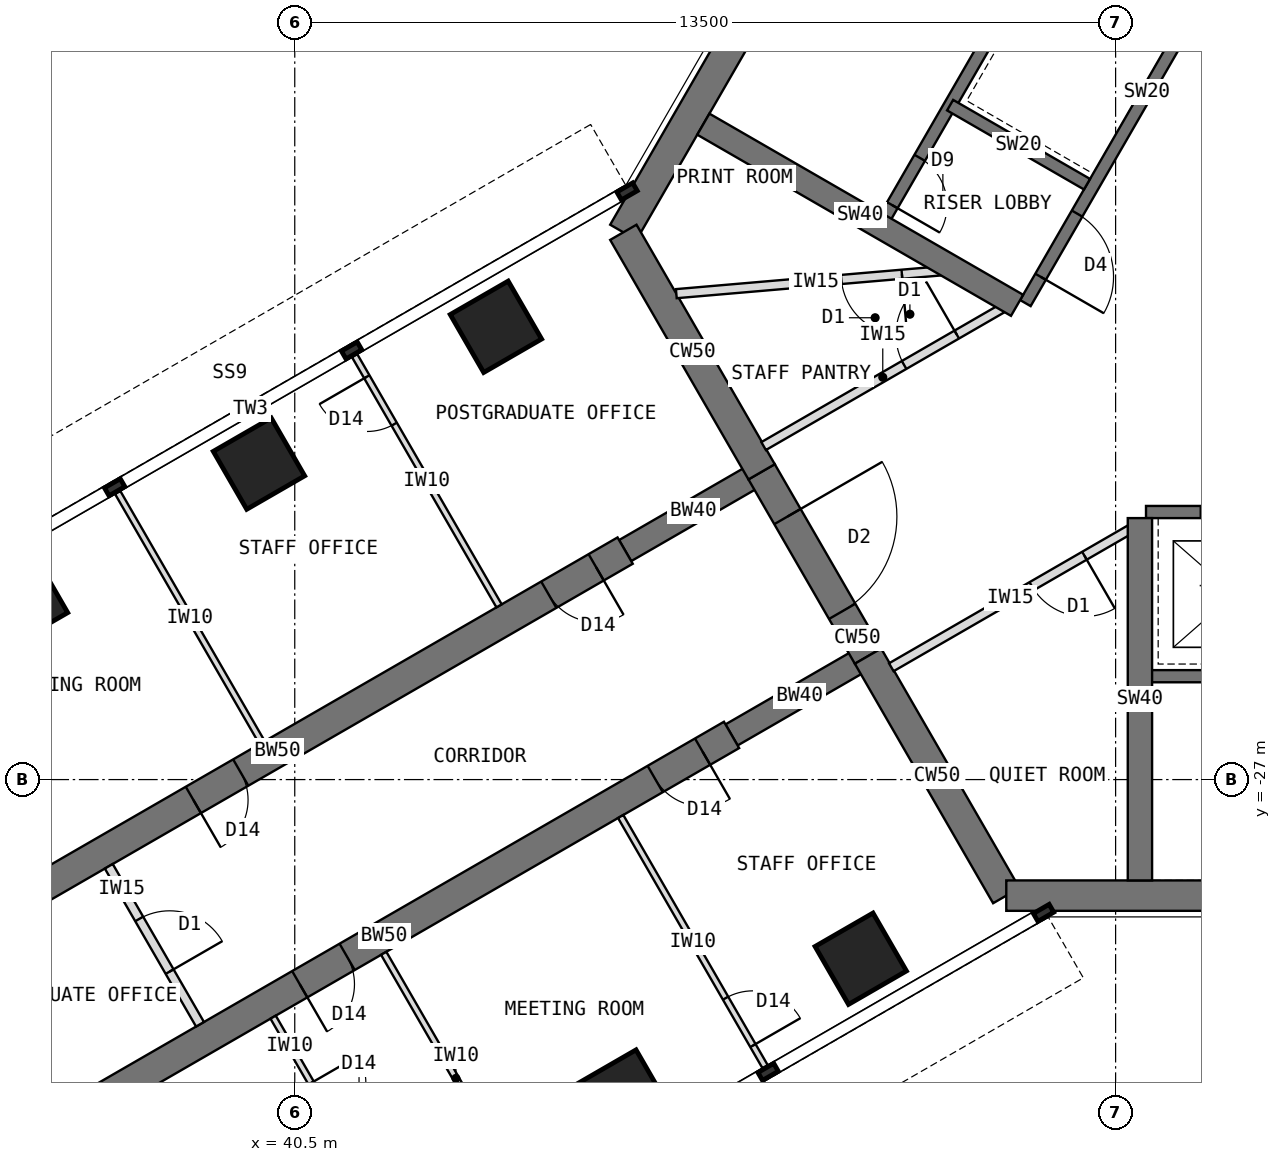
"""IFC4 building model, lengths in metres.
Left out: names, types, materials, properties, quantities, classifications, styles, units other than length and angle.
Written with IfcOpenShell. Run it as: python <this file> out.ifc"""

import sys

from ifc_helpers import new_model, si_unit, direction, frame, frame_2d, origin, origin_2d, place, context, subcontext, project, spatial, rectangle, extrude, element, fill, save


model = new_model("IFC4")
c1 = context("Model", 3, precision=1e-05, world=origin(), true_north=direction((0.0, 1.0)))
c2 = subcontext(c1, "Body", "Model", "MODEL_VIEW")
j1 = project(units=[si_unit("LENGTHUNIT", "METRE"), si_unit("PLANEANGLEUNIT", "RADIAN")], contexts=[c1])
p1 = place(None, origin())
s1 = spatial("IfcSite", under=j1, at=p1, CompositionType="ELEMENT")
p2 = place(p1, origin())
s2 = spatial("IfcBuilding", under=s1, at=p2, CompositionType="ELEMENT")
p3 = place(p2, frame((0.0, 0.0, 230.5)))
s3 = spatial("IfcBuildingStorey", under=s2, at=p3, CompositionType="ELEMENT", Elevation=230.5)
p4 = place(p3, frame((52.202, -7.092, 0.0), z_axis=(0.0, 0.0, 1.0), x_axis=(-0.500005998175, -0.866021940709, 0.0)))
e1 = element("IfcWall", 1, at=p4, inside=s3, PredefinedType="SHEAR", context=c2, shape_type="SweptSolid", body=[
    extrude(rectangle(XDim=12.596, YDim=0.5, at=frame_2d((6.298, 0.0))), origin(), (0.0, 0.0, 1.0), 4.0),
])
p5 = place(p3, frame((45.904, -18.0, 0.0), z_axis=(0.0, 0.0, 1.0), x_axis=(0.500024481964, -0.866011268655, 0.0)))
e2 = element("IfcWall", 2, at=p5, inside=s3, PredefinedType="SHEAR", context=c2, shape_type="SweptSolid", body=[
    extrude(rectangle(XDim=4.548, YDim=0.5, at=frame_2d((2.274, 0.0))), origin(), (0.0, 0.0, 1.0), 4.0),
])
p6 = place(p3, frame((48.178, -21.939, 0.0), z_axis=(0.0, 0.0, 1.0), x_axis=(0.500010275428, -0.866019471182, 0.0)))
e3 = element("IfcWall", 3, at=p6, inside=s3, PredefinedType="SHEAR", context=c2, shape_type="SweptSolid", body=[
    extrude(rectangle(XDim=3.5, YDim=0.5, at=frame_2d((1.75, 0.0))), origin(), (0.0, 0.0, 1.0), 4.0),
])
p7 = place(p6, frame((0.85, 0.0, 0.0)))
e4 = element("IfcOpeningElement", 4, at=p7, cuts=e3, PredefinedType="OPENING", context=c2, shape_type="SweptSolid", body=[
    extrude(rectangle(XDim=1.8, YDim=2.1, at=frame_2d((0.9, 1.05))), frame((0.0, 0.26, 0.0), z_axis=(0.0, -1.0, 0.0), x_axis=(1.0, 0.0, 0.0)), (0.0, 0.0, 1.0), 0.52),
])
p8 = place(p3, frame((49.928, -24.97, 0.0), z_axis=(0.0, 0.0, 1.0), x_axis=(0.499984222037, -0.866034513004, 0.0)))
e5 = element("IfcWall", 5, at=p8, inside=s3, PredefinedType="SHEAR", context=c2, shape_type="SweptSolid", body=[
    extrude(rectangle(XDim=4.548, YDim=0.5, at=frame_2d((2.274, 0.0))), origin(), (0.0, 0.0, 1.0), 4.0),
])
p9 = place(p3, frame((52.202, -28.908, 0.0), z_axis=(0.0, 0.0, 1.0), x_axis=(1.0, 0.0, 0.0)))
e6 = element("IfcWall", 6, at=p9, inside=s3, PredefinedType="SHEAR", context=c2, shape_type="SweptSolid", body=[
    extrude(rectangle(XDim=12.596, YDim=0.5, at=frame_2d((6.298, 0.0))), origin(), (0.0, 0.0, 1.0), 4.0),
])
p10 = place(p3, frame((49.928, -24.97, 0.0), z_axis=(0.0, 0.0, 1.0), x_axis=(-0.866031863473, -0.499988811324, 0.0)))
e7 = element("IfcWall", 7, at=p10, inside=s3, PredefinedType="SHEAR", context=c2, shape_type="SweptSolid", body=[
    extrude(rectangle(XDim=2.592, YDim=0.4, at=frame_2d((1.296, 0.0))), origin(), (0.0, 0.0, 1.0), 4.0),
])
p11 = place(p3, frame((47.684, -26.266, 0.0), z_axis=(0.0, 0.0, 1.0), x_axis=(-0.866027579429, -0.499996231654, 0.0)))
e8 = element("IfcWall", 8, at=p11, inside=s3, PredefinedType="SHEAR", context=c2, shape_type="SweptSolid", body=[
    extrude(rectangle(XDim=13.2, YDim=0.5, at=frame_2d((6.6, 0.0))), origin(), (0.0, 0.0, 1.0), 4.0),
])
p12 = place(p11, frame((0.55, 0.0, 0.0)))
e9 = element("IfcOpeningElement", 9, at=p12, cuts=e8, PredefinedType="OPENING", context=c2, shape_type="SweptSolid", body=[
    extrude(rectangle(XDim=0.9, YDim=2.1, at=frame_2d((0.45, 1.05))), frame((0.0, 0.26, 0.0), z_axis=(0.0, -1.0, 0.0), x_axis=(1.0, 0.0, 0.0)), (0.0, 0.0, 1.0), 0.52),
])
p13 = place(p11, frame((7.3, 0.0, 0.0)))
e10 = element("IfcOpeningElement", 10, at=p13, cuts=e8, PredefinedType="OPENING", context=c2, shape_type="SweptSolid", body=[
    extrude(rectangle(XDim=0.9, YDim=2.1, at=frame_2d((0.45, 1.05))), frame((0.0, 0.26, 0.0), z_axis=(0.0, -1.0, 0.0), x_axis=(1.0, 0.0, 0.0)), (0.0, 0.0, 1.0), 0.52),
])
p14 = place(p3, frame((48.178, -21.939, 0.0), z_axis=(0.0, 0.0, 1.0), x_axis=(-0.866072649678, -0.499918158782, 0.0)))
e11 = element("IfcWall", 11, at=p14, inside=s3, PredefinedType="SHEAR", context=c2, shape_type="SweptSolid", body=[
    extrude(rectangle(XDim=2.592, YDim=0.4, at=frame_2d((1.296, 0.0))), origin(), (0.0, 0.0, 1.0), 4.0),
])
p15 = place(p3, frame((45.934, -23.234, 0.0), z_axis=(0.0, 0.0, 1.0), x_axis=(-0.866019570528, -0.500010103361, 0.0)))
e12 = element("IfcWall", 12, at=p15, inside=s3, PredefinedType="SHEAR", context=c2, shape_type="SweptSolid", body=[
    extrude(rectangle(XDim=13.2, YDim=0.5, at=frame_2d((6.6, 0.0))), origin(), (0.0, 0.0, 1.0), 4.0),
])
p16 = place(p15, frame((0.55, 0.0, 0.0)))
e13 = element("IfcOpeningElement", 13, at=p16, cuts=e12, PredefinedType="OPENING", context=c2, shape_type="SweptSolid", body=[
    extrude(rectangle(XDim=0.9, YDim=2.1, at=frame_2d((0.45, 1.05))), frame((0.0, 0.26, 0.0), z_axis=(0.0, -1.0, 0.0), x_axis=(1.0, 0.0, 0.0)), (0.0, 0.0, 1.0), 0.52),
])
p17 = place(p15, frame((7.3, 0.0, 0.0)))
e14 = element("IfcOpeningElement", 14, at=p17, cuts=e12, PredefinedType="OPENING", context=c2, shape_type="SweptSolid", body=[
    extrude(rectangle(XDim=0.9, YDim=2.1, at=frame_2d((0.45, 1.05))), frame((0.0, 0.26, 0.0), z_axis=(0.0, -1.0, 0.0), x_axis=(1.0, 0.0, 0.0)), (0.0, 0.0, 1.0), 0.52),
])
for number, where, z_axis, x_axis in (
    (15, (49.809, -29.946, 0.0), (0.0, 0.0, 1.0), (0.866, 0.5, 0.0)),
    (16, (43.809, -19.554, 0.0), (0.0, 0.0, 1.0), (0.866, 0.5, 0.0)),
    (17, (45.912, -32.196, 0.0), (0.0, 0.0, 1.0), (0.866, 0.5, 0.0)),
    (18, (39.912, -21.804, 0.0), (0.0, 0.0, 1.0), (0.866, 0.5, 0.0)),
    (19, (36.014, -24.054, 0.0), (0.0, 0.0, 1.0), (0.866, 0.5, 0.0)),
):
    element("IfcColumn", number, at=place(p3, frame(where, z_axis=z_axis, x_axis=x_axis)), inside=s3, PredefinedType="COLUMN", context=c2, shape_type="SweptSolid", body=[
        extrude(rectangle(XDim=1.1, YDim=1.1, at=origin_2d()), origin(), (0.0, 0.0, 1.0), 4.0),
    ])
p18 = place(p3, frame((56.516, -12.236, 0.0), z_axis=(0.0, 0.0, 1.0), x_axis=(-0.49999894854, -0.866026010844, 0.0)))
e20 = element("IfcWall", 20, at=p18, inside=s3, PredefinedType="SHEAR", context=c2, shape_type="SweptSolid", body=[
    extrude(rectangle(XDim=8.0, YDim=0.2, at=frame_2d((4.0, 0.0))), origin(), (0.0, 0.0, 1.0), 4.0),
])
p19 = place(p18, frame((6.3, 0.0, 0.0)))
e21 = element("IfcOpeningElement", 21, at=p19, cuts=e20, PredefinedType="OPENING", context=c2, shape_type="SweptSolid", body=[
    extrude(rectangle(XDim=1.2, YDim=2.1, at=frame_2d((0.6, 1.05))), frame((0.0, 0.11, 0.0), z_axis=(0.0, -1.0, 0.0), x_axis=(1.0, 0.0, 0.0)), (0.0, 0.0, 1.0), 0.22),
])
p20 = place(p3, frame((53.53, -17.209, 0.0), z_axis=(0.0, 0.0, 1.0), x_axis=(-0.866062058628, 0.499936506574, 0.0)))
e22 = element("IfcWall", 22, at=p20, inside=s3, PredefinedType="SHEAR", context=c2, shape_type="SweptSolid", body=[
    extrude(rectangle(XDim=2.6, YDim=0.2, at=frame_2d((1.3, 0.0))), origin(), (0.0, 0.0, 1.0), 4.0),
])
p21 = place(p3, frame((54.178, -10.886, 0.0), z_axis=(0.0, 0.0, 1.0), x_axis=(-0.49999894854, -0.866026010844, 0.0)))
e23 = element("IfcWall", 23, at=p21, inside=s3, PredefinedType="SHEAR", context=c2, shape_type="SweptSolid", body=[
    extrude(rectangle(XDim=8.0, YDim=0.2, at=frame_2d((4.0, 0.0))), origin(), (0.0, 0.0, 1.0), 4.0),
])
p22 = place(p21, frame((6.8, 0.0, 0.0)))
e24 = element("IfcOpeningElement", 24, at=p22, cuts=e23, PredefinedType="OPENING", context=c2, shape_type="SweptSolid", body=[
    extrude(rectangle(XDim=0.9, YDim=2.1, at=frame_2d((0.45, 1.05))), frame((0.0, 0.11, 0.0), z_axis=(0.0, -1.0, 0.0), x_axis=(1.0, 0.0, 0.0)), (0.0, 0.0, 1.0), 0.22),
])
p23 = place(p3, frame((52.38, -19.201, 0.0), z_axis=(0.0, 0.0, 1.0), x_axis=(-0.866012946976, 0.500021575205, 0.0)))
e25 = element("IfcWall", 25, at=p23, inside=s3, PredefinedType="SHEAR", context=c2, shape_type="SweptSolid", body=[
    extrude(rectangle(XDim=5.958, YDim=0.4, at=frame_2d((2.979, 0.0))), origin(), (0.0, 0.0, 1.0), 4.0),
])
p24 = place(p3, frame((54.5, -22.6, 0.0), z_axis=(0.0, 0.0, 1.0), x_axis=(1.0, 0.0, 0.0)))
e26 = element("IfcWall", 26, at=p24, inside=s3, PredefinedType="SHEAR", context=c2, shape_type="SweptSolid", body=[
    extrude(rectangle(XDim=8.0, YDim=0.2, at=frame_2d((4.0, 0.0))), origin(), (0.0, 0.0, 1.0), 4.0),
])
p25 = place(p24, frame((6.3, 0.0, 0.0)))
e27 = element("IfcOpeningElement", 27, at=p25, cuts=e26, PredefinedType="OPENING", context=c2, shape_type="SweptSolid", body=[
    extrude(rectangle(XDim=1.2, YDim=2.1, at=frame_2d((0.6, 1.05))), frame((0.0, 0.11, 0.0), z_axis=(0.0, -1.0, 0.0), x_axis=(1.0, 0.0, 0.0)), (0.0, 0.0, 1.0), 0.22),
])
p26 = place(p24, frame((0.9, 0.0, 0.0)))
e28 = element("IfcOpeningElement", 28, at=p26, cuts=e26, PredefinedType="OPENING", context=c2, shape_type="SweptSolid", body=[
    extrude(rectangle(XDim=1.1, YDim=2.2, at=frame_2d((0.55, 1.1))), frame((0.0, 0.11, 0.0), z_axis=(0.0, -1.0, 0.0), x_axis=(1.0, 0.0, 0.0)), (0.0, 0.0, 1.0), 0.22),
])
p27 = place(p3, frame((54.5, -25.3, 0.0), z_axis=(0.0, 0.0, 1.0), x_axis=(1.0, 0.0, 0.0)))
e29 = element("IfcWall", 29, at=p27, inside=s3, PredefinedType="SHEAR", context=c2, shape_type="SweptSolid", body=[
    extrude(rectangle(XDim=8.0, YDim=0.2, at=frame_2d((4.0, 0.0))), origin(), (0.0, 0.0, 1.0), 4.0),
])
p28 = place(p27, frame((6.7, 0.0, 0.0)))
e30 = element("IfcOpeningElement", 30, at=p28, cuts=e29, PredefinedType="OPENING", context=c2, shape_type="SweptSolid", body=[
    extrude(rectangle(XDim=1.1, YDim=2.1, at=frame_2d((0.55, 1.05))), frame((0.0, 0.11, 0.0), z_axis=(0.0, -1.0, 0.0), x_axis=(1.0, 0.0, 0.0)), (0.0, 0.0, 1.0), 0.22),
])
p29 = place(p3, frame((54.4, -22.7, 0.0), z_axis=(0.0, 0.0, 1.0), x_axis=(0.0, -1.0, 0.0)))
e31 = element("IfcWall", 31, at=p29, inside=s3, PredefinedType="SHEAR", context=c2, shape_type="SweptSolid", body=[
    extrude(rectangle(XDim=5.958, YDim=0.4, at=frame_2d((2.979, 0.0))), origin(), (0.0, 0.0, 1.0), 4.0),
])
p30 = place(p3, frame((45.86, -27.607, 0.0), z_axis=(0.0, 0.0, 1.0), x_axis=(0.499986429846, -0.866033238375, 0.0)))
e32 = element("IfcWall", 32, at=p30, inside=s3, PredefinedType="PARTITIONING", context=c2, shape_type="SweptSolid", body=[
    extrude(rectangle(XDim=4.75, YDim=0.1, at=frame_2d((2.375, 0.0))), origin(), (0.0, 0.0, 1.0), 3.8),
])
p31 = place(p30, frame((3.45, 0.0, 0.0)))
e33 = element("IfcOpeningElement", 33, at=p31, cuts=e32, PredefinedType="OPENING", context=c2, shape_type="SweptSolid", body=[
    extrude(rectangle(XDim=0.9, YDim=2.1, at=frame_2d((0.45, 1.05))), frame((0.0, 0.06, 0.0), z_axis=(0.0, -1.0, 0.0), x_axis=(1.0, 0.0, 0.0)), (0.0, 0.0, 1.0), 0.12),
])
p32 = place(p3, frame((41.963, -29.857, 0.0), z_axis=(0.0, 0.0, 1.0), x_axis=(0.499986429846, -0.866033238375, 0.0)))
e34 = element("IfcWall", 34, at=p32, inside=s3, PredefinedType="PARTITIONING", context=c2, shape_type="SweptSolid", body=[
    extrude(rectangle(XDim=4.75, YDim=0.1, at=frame_2d((2.375, 0.0))), origin(), (0.0, 0.0, 1.0), 3.8),
])
p33 = place(p3, frame((40.144, -30.907, 0.0), z_axis=(0.0, 0.0, 1.0), x_axis=(0.499977295307, -0.866038511948, 0.0)))
e35 = element("IfcWall", 35, at=p33, inside=s3, PredefinedType="PARTITIONING", context=c2, shape_type="SweptSolid", body=[
    extrude(rectangle(XDim=3.4, YDim=0.1, at=frame_2d((1.7, 0.0))), origin(), (0.0, 0.0, 1.0), 3.8),
])
p34 = place(p33, frame((1.25, 0.0, 0.0)))
e36 = element("IfcOpeningElement", 36, at=p34, cuts=e35, PredefinedType="OPENING", context=c2, shape_type="SweptSolid", body=[
    extrude(rectangle(XDim=0.9, YDim=2.1, at=frame_2d((0.45, 1.05))), frame((0.0, 0.06, 0.0), z_axis=(0.0, -1.0, 0.0), x_axis=(1.0, 0.0, 0.0)), (0.0, 0.0, 1.0), 0.12),
])
p35 = place(p3, frame((43.86, -24.143, 0.0), z_axis=(0.0, 0.0, 1.0), x_axis=(-0.499986429846, 0.866033238375, 0.0)))
e37 = element("IfcWall", 37, at=p35, inside=s3, PredefinedType="PARTITIONING", context=c2, shape_type="SweptSolid", body=[
    extrude(rectangle(XDim=4.75, YDim=0.1, at=frame_2d((2.375, 0.0))), origin(), (0.0, 0.0, 1.0), 3.8),
])
p36 = place(p35, frame((3.45, 0.0, 0.0)))
e38 = element("IfcOpeningElement", 38, at=p36, cuts=e37, PredefinedType="OPENING", context=c2, shape_type="SweptSolid", body=[
    extrude(rectangle(XDim=0.9, YDim=2.1, at=frame_2d((0.45, 1.05))), frame((0.0, 0.06, 0.0), z_axis=(0.0, -1.0, 0.0), x_axis=(1.0, 0.0, 0.0)), (0.0, 0.0, 1.0), 0.12),
])
p37 = place(p3, frame((39.963, -26.393, 0.0), z_axis=(0.0, 0.0, 1.0), x_axis=(-0.499986429846, 0.866033238375, 0.0)))
e39 = element("IfcWall", 39, at=p37, inside=s3, PredefinedType="PARTITIONING", context=c2, shape_type="SweptSolid", body=[
    extrude(rectangle(XDim=4.75, YDim=0.1, at=frame_2d((2.375, 0.0))), origin(), (0.0, 0.0, 1.0), 3.8),
])
p38 = place(p3, frame((54.23, -22.89, 0.0), z_axis=(0.0, 0.0, 1.0), x_axis=(-0.866006805923, -0.500032211057, 0.0)))
e40 = element("IfcWall", 40, at=p38, inside=s3, PredefinedType="PARTITIONING", context=c2, shape_type="SweptSolid", body=[
    extrude(rectangle(XDim=4.526, YDim=0.15, at=frame_2d((2.263, 0.0))), origin(), (0.0, 0.0, 1.0), 3.8),
])
p39 = place(p38, frame((0.858, 0.0, 0.0)))
e41 = element("IfcOpeningElement", 41, at=p39, cuts=e40, PredefinedType="OPENING", context=c2, shape_type="SweptSolid", body=[
    extrude(rectangle(XDim=1.0, YDim=2.1, at=frame_2d((0.5, 1.05))), frame((0.0, 0.085, 0.0), z_axis=(0.0, -1.0, 0.0), x_axis=(1.0, 0.0, 0.0)), (0.0, 0.0, 1.0), 0.17),
])
p40 = place(p3, frame((48.211, -21.515, 0.0), z_axis=(0.0, 0.0, 1.0), x_axis=(0.866043651885, 0.499968392031, 0.0)))
e42 = element("IfcWall", 42, at=p40, inside=s3, PredefinedType="PARTITIONING", context=c2, shape_type="SweptSolid", body=[
    extrude(rectangle(XDim=4.526, YDim=0.15, at=frame_2d((2.263, 0.0))), origin(), (0.0, 0.0, 1.0), 3.8),
])
p41 = place(p40, frame((2.668, 0.0, 0.0)))
e43 = element("IfcOpeningElement", 43, at=p41, cuts=e42, PredefinedType="OPENING", context=c2, shape_type="SweptSolid", body=[
    extrude(rectangle(XDim=1.0, YDim=2.1, at=frame_2d((0.5, 1.05))), frame((0.0, 0.085, 0.0), z_axis=(0.0, -1.0, 0.0), x_axis=(1.0, 0.0, 0.0)), (0.0, 0.0, 1.0), 0.17),
])
p42 = place(p3, frame((51.364, -18.614, 0.0), z_axis=(0.0, 0.0, 1.0), x_axis=(-0.996314617181, -0.085774026317, 0.0)))
e44 = element("IfcWall", 44, at=p42, inside=s3, PredefinedType="PARTITIONING", context=c2, shape_type="SweptSolid", body=[
    extrude(rectangle(XDim=4.605, YDim=0.15, at=frame_2d((2.303, 0.0))), origin(), (0.0, 0.0, 1.0), 3.8),
])
p43 = place(p42, frame((0.882, 0.0, 0.0)))
e45 = element("IfcOpeningElement", 45, at=p43, cuts=e44, PredefinedType="OPENING", context=c2, shape_type="SweptSolid", body=[
    extrude(rectangle(XDim=1.0, YDim=2.1, at=frame_2d((0.5, 1.05))), frame((0.0, 0.085, 0.0), z_axis=(0.0, -1.0, 0.0), x_axis=(1.0, 0.0, 0.0)), (0.0, 0.0, 1.0), 0.17),
])
p44 = place(p3, frame((37.442, -28.426, 0.0), z_axis=(0.0, 0.0, 1.0), x_axis=(0.50002537861, -0.866010750942, 0.0)))
e46 = element("IfcWall", 46, at=p44, inside=s3, PredefinedType="PARTITIONING", context=c2, shape_type="SweptSolid", body=[
    extrude(rectangle(XDim=3.0, YDim=0.15, at=frame_2d((1.5, 0.0))), origin(), (0.0, 0.0, 1.0), 3.8),
])
p45 = place(p44, frame((1.0, 0.0, 0.0)))
e47 = element("IfcOpeningElement", 47, at=p45, cuts=e46, PredefinedType="OPENING", context=c2, shape_type="SweptSolid", body=[
    extrude(rectangle(XDim=1.0, YDim=2.1, at=frame_2d((0.5, 1.05))), frame((0.0, 0.085, 0.0), z_axis=(0.0, -1.0, 0.0), x_axis=(1.0, 0.0, 0.0)), (0.0, 0.0, 1.0), 0.17),
])
p46 = place(p19, origin())
e48 = element("IfcDoor", 48, at=p46, inside=s3, OperationType="SINGLE_SWING_RIGHT", PredefinedType="DOOR", context=c2, shape_type="SweptSolid", body=[
    extrude(rectangle(XDim=1.2, YDim=2.1, at=frame_2d((0.6, 1.05))), frame((0.0, 0.025, 0.0), z_axis=(0.0, -1.0, 0.0), x_axis=(1.0, 0.0, 0.0)), (0.0, 0.0, 1.0), 0.05),
])
fill(e21, e48)
p47 = place(p22, origin())
e49 = element("IfcDoor", 49, at=p47, inside=s3, OperationType="SINGLE_SWING_RIGHT", PredefinedType="DOOR", context=c2, shape_type="SweptSolid", body=[
    extrude(rectangle(XDim=0.9, YDim=2.1, at=frame_2d((0.45, 1.05))), frame((0.0, 0.025, 0.0), z_axis=(0.0, -1.0, 0.0), x_axis=(1.0, 0.0, 0.0)), (0.0, 0.0, 1.0), 0.05),
])
fill(e24, e49)
p48 = place(p7, origin())
e50 = element("IfcDoor", 50, at=p48, inside=s3, OperationType="DOUBLE_DOOR_DOUBLE_SWING", PredefinedType="DOOR", context=c2, shape_type="SweptSolid", body=[
    extrude(rectangle(XDim=1.8, YDim=2.1, at=frame_2d((0.9, 1.05))), frame((0.0, 0.025, 0.0), z_axis=(0.0, -1.0, 0.0), x_axis=(1.0, 0.0, 0.0)), (0.0, 0.0, 1.0), 0.05),
])
fill(e4, e50)
p49 = place(p31, origin())
e51 = element("IfcDoor", 51, at=p49, inside=s3, OperationType="SINGLE_SWING_RIGHT", PredefinedType="DOOR", context=c2, shape_type="SweptSolid", body=[
    extrude(rectangle(XDim=0.9, YDim=2.1, at=frame_2d((0.45, 1.05))), frame((0.0, 0.025, 0.0), z_axis=(0.0, -1.0, 0.0), x_axis=(1.0, 0.0, 0.0)), (0.0, 0.0, 1.0), 0.05),
])
fill(e33, e51)
p50 = place(p34, origin())
e52 = element("IfcDoor", 52, at=p50, inside=s3, OperationType="SINGLE_SWING_LEFT", PredefinedType="DOOR", context=c2, shape_type="SweptSolid", body=[
    extrude(rectangle(XDim=0.9, YDim=2.1, at=frame_2d((0.45, 1.05))), frame((0.0, 0.025, 0.0), z_axis=(0.0, -1.0, 0.0), x_axis=(1.0, 0.0, 0.0)), (0.0, 0.0, 1.0), 0.05),
])
fill(e36, e52)
p51 = place(p36, origin())
e53 = element("IfcDoor", 53, at=p51, inside=s3, OperationType="SINGLE_SWING_RIGHT", PredefinedType="DOOR", context=c2, shape_type="SweptSolid", body=[
    extrude(rectangle(XDim=0.9, YDim=2.1, at=frame_2d((0.45, 1.05))), frame((0.0, 0.025, 0.0), z_axis=(0.0, -1.0, 0.0), x_axis=(1.0, 0.0, 0.0)), (0.0, 0.0, 1.0), 0.05),
])
fill(e38, e53)
p52 = place(p43, origin())
e54 = element("IfcDoor", 54, at=p52, inside=s3, OperationType="SINGLE_SWING_LEFT", PredefinedType="DOOR", context=c2, shape_type="SweptSolid", body=[
    extrude(rectangle(XDim=1.0, YDim=2.1, at=frame_2d((0.5, 1.05))), frame((0.0, 0.025, 0.0), z_axis=(0.0, -1.0, 0.0), x_axis=(1.0, 0.0, 0.0)), (0.0, 0.0, 1.0), 0.05),
])
fill(e45, e54)
p53 = place(p41, origin())
e55 = element("IfcDoor", 55, at=p53, inside=s3, OperationType="SINGLE_SWING_RIGHT", PredefinedType="DOOR", context=c2, shape_type="SweptSolid", body=[
    extrude(rectangle(XDim=1.0, YDim=2.1, at=frame_2d((0.5, 1.05))), frame((0.0, 0.025, 0.0), z_axis=(0.0, -1.0, 0.0), x_axis=(1.0, 0.0, 0.0)), (0.0, 0.0, 1.0), 0.05),
])
fill(e43, e55)
p54 = place(p39, origin())
e56 = element("IfcDoor", 56, at=p54, inside=s3, OperationType="SINGLE_SWING_LEFT", PredefinedType="DOOR", context=c2, shape_type="SweptSolid", body=[
    extrude(rectangle(XDim=1.0, YDim=2.1, at=frame_2d((0.5, 1.05))), frame((0.0, 0.025, 0.0), z_axis=(0.0, -1.0, 0.0), x_axis=(1.0, 0.0, 0.0)), (0.0, 0.0, 1.0), 0.05),
])
fill(e41, e56)
p55 = place(p45, origin())
e57 = element("IfcDoor", 57, at=p55, inside=s3, OperationType="SINGLE_SWING_RIGHT", PredefinedType="DOOR", context=c2, shape_type="SweptSolid", body=[
    extrude(rectangle(XDim=1.0, YDim=2.1, at=frame_2d((0.5, 1.05))), frame((0.0, 0.025, 0.0), z_axis=(0.0, -1.0, 0.0), x_axis=(1.0, 0.0, 0.0)), (0.0, 0.0, 1.0), 0.05),
])
fill(e47, e57)
p56 = place(p12, origin())
e58 = element("IfcDoor", 58, at=p56, inside=s3, OperationType="SINGLE_SWING_LEFT", PredefinedType="DOOR", context=c2, shape_type="SweptSolid", body=[
    extrude(rectangle(XDim=0.9, YDim=2.1, at=frame_2d((0.45, 1.05))), frame((0.0, 0.025, 0.0), z_axis=(0.0, -1.0, 0.0), x_axis=(1.0, 0.0, 0.0)), (0.0, 0.0, 1.0), 0.05),
])
fill(e9, e58)
p57 = place(p13, origin())
e59 = element("IfcDoor", 59, at=p57, inside=s3, OperationType="SINGLE_SWING_RIGHT", PredefinedType="DOOR", context=c2, shape_type="SweptSolid", body=[
    extrude(rectangle(XDim=0.9, YDim=2.1, at=frame_2d((0.45, 1.05))), frame((0.0, 0.025, 0.0), z_axis=(0.0, -1.0, 0.0), x_axis=(1.0, 0.0, 0.0)), (0.0, 0.0, 1.0), 0.05),
])
fill(e10, e59)
p58 = place(p16, origin())
e60 = element("IfcDoor", 60, at=p58, inside=s3, OperationType="SINGLE_SWING_LEFT", PredefinedType="DOOR", context=c2, shape_type="SweptSolid", body=[
    extrude(rectangle(XDim=0.9, YDim=2.1, at=frame_2d((0.45, 1.05))), frame((0.0, 0.025, 0.0), z_axis=(0.0, -1.0, 0.0), x_axis=(1.0, 0.0, 0.0)), (0.0, 0.0, 1.0), 0.05),
])
fill(e13, e60)
p59 = place(p17, origin())
e61 = element("IfcDoor", 61, at=p59, inside=s3, OperationType="SINGLE_SWING_RIGHT", PredefinedType="DOOR", context=c2, shape_type="SweptSolid", body=[
    extrude(rectangle(XDim=0.9, YDim=2.1, at=frame_2d((0.45, 1.05))), frame((0.0, 0.025, 0.0), z_axis=(0.0, -1.0, 0.0), x_axis=(1.0, 0.0, 0.0)), (0.0, 0.0, 1.0), 0.05),
])
fill(e14, e61)
save(model, sys.argv[1])
